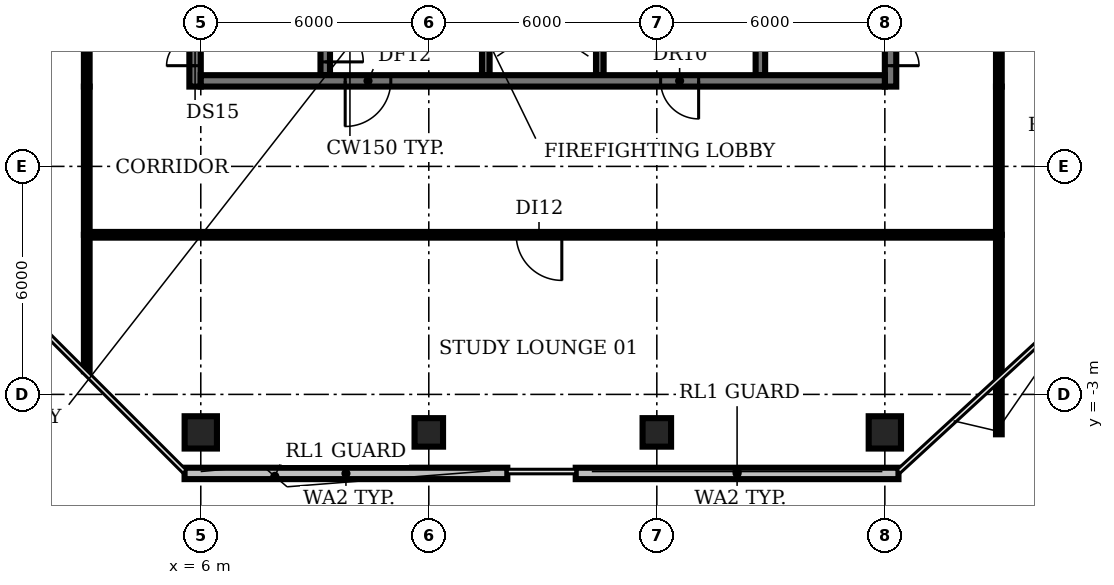
"""IFC4 building model, lengths in metres.
Left out: names, types, materials, properties, quantities, classifications, styles, units other than length and angle.
Written with IfcOpenShell. Run it as: python <this file> out.ifc"""

import sys

from ifc_helpers import new_model, si_unit, direction, frame, frame_2d, origin, origin_2d, place, context, subcontext, project, spatial, rectangle, circle, extrude, element, fill, save


model = new_model("IFC4")
c1 = context("Model", 3, precision=1e-05, world=origin(), true_north=direction((0.0, 1.0)))
c2 = subcontext(c1, "Body", "Model", "MODEL_VIEW")
j1 = project(units=[si_unit("LENGTHUNIT", "METRE"), si_unit("PLANEANGLEUNIT", "RADIAN")], contexts=[c1])
p1 = place(None, origin())
s1 = spatial("IfcSite", under=j1, at=p1, CompositionType="ELEMENT")
p2 = place(p1, origin())
s2 = spatial("IfcBuilding", under=s1, at=p2, CompositionType="ELEMENT")
p3 = place(p2, frame((0.0, 0.0, 306.2)))
s3 = spatial("IfcBuildingStorey", under=s2, at=p3, CompositionType="ELEMENT", Elevation=306.2)
p4 = place(p3, frame((6.0, -4.0, 0.0), z_axis=(0.0, 0.0, 1.0), x_axis=(1.0, 0.0, 0.0)))
e1 = element("IfcColumn", 1, at=p4, inside=s3, PredefinedType="COLUMN", context=c2, shape_type="SweptSolid", body=[
    extrude(circle(Radius=0.425, at=origin_2d()), origin(), (0.0, 0.0, 1.0), 3.85),
])
for number, where, z_axis, x_axis in (
    (2, (12.0, -4.0, 0.0), (0.0, 0.0, 1.0), (1.0, 0.0, 0.0)),
    (3, (18.0, -4.0, 0.0), (0.0, 0.0, 1.0), (1.0, 0.0, 0.0)),
):
    element("IfcColumn", number, at=place(p3, frame(where, z_axis=z_axis, x_axis=x_axis)), inside=s3, PredefinedType="COLUMN", context=c2, shape_type="SweptSolid", body=[
        extrude(rectangle(XDim=0.75, YDim=0.75, at=origin_2d()), origin(), (0.0, 0.0, 1.0), 3.85),
    ])
p5 = place(p3, frame((24.0, -4.0, 0.0), z_axis=(0.0, 0.0, 1.0), x_axis=(1.0, 0.0, 0.0)))
e4 = element("IfcColumn", 4, at=p5, inside=s3, PredefinedType="COLUMN", context=c2, shape_type="SweptSolid", body=[
    extrude(circle(Radius=0.425, at=origin_2d()), origin(), (0.0, 0.0, 1.0), 3.85),
])
p6 = place(p3, frame((5.573, -5.08, 0.0), z_axis=(0.0, 0.0, 1.0), x_axis=(1.0, 0.0, 0.0)))
e5 = element("IfcWall", 5, at=p6, inside=s3, PredefinedType="SOLIDWALL", context=c2, shape_type="SweptSolid", body=[
    extrude(rectangle(XDim=8.492, YDim=0.3, at=frame_2d((4.246, 0.0))), origin(), (0.0, 0.0, 1.0), 3.85),
])
p7 = place(p3, frame((15.866, -5.08, 0.0), z_axis=(0.0, 0.0, 1.0), x_axis=(1.0, 0.0, 0.0)))
e6 = element("IfcWall", 6, at=p7, inside=s3, PredefinedType="SOLIDWALL", context=c2, shape_type="SweptSolid", body=[
    extrude(rectangle(XDim=8.493, YDim=0.3, at=frame_2d((4.246, 0.0))), origin(), (0.0, 0.0, 1.0), 3.85),
])
p8 = place(p3, frame((9.275, 11.825, 0.0), z_axis=(0.0, 0.0, 1.0), x_axis=(0.0, -1.0, 0.0)))
e7 = element("IfcWall", 7, at=p8, inside=s3, PredefinedType="SHEAR", context=c2, shape_type="SweptSolid", body=[
    extrude(rectangle(XDim=6.425, YDim=0.25, at=frame_2d((3.212, 0.0))), origin(), (0.0, 0.0, 1.0), 3.85),
])
p9 = place(p8, frame((5.075, 0.0, 0.0)))
e8 = element("IfcOpeningElement", 8, at=p9, cuts=e7, PredefinedType="OPENING", context=c2, shape_type="SweptSolid", body=[
    extrude(rectangle(XDim=1.0, YDim=2.1, at=frame_2d((0.5, 1.05))), frame((0.0, 0.135, 0.0), z_axis=(0.0, -1.0, 0.0), x_axis=(1.0, 0.0, 0.0)), (0.0, 0.0, 1.0), 0.27),
])
p10 = place(p3, frame((13.5, 5.4, 0.0), z_axis=(0.0, 0.0, 1.0), x_axis=(0.0, 1.0, 0.0)))
e9 = element("IfcWall", 9, at=p10, inside=s3, PredefinedType="SHEAR", context=c2, shape_type="SweptSolid", body=[
    extrude(rectangle(XDim=8.2, YDim=0.2, at=frame_2d((4.1, 0.0))), origin(), (0.0, 0.0, 1.0), 3.85),
])
p11 = place(p10, frame((0.75, 0.0, 0.0)))
e10 = element("IfcOpeningElement", 10, at=p11, cuts=e9, PredefinedType="OPENING", context=c2, shape_type="SweptSolid", body=[
    extrude(rectangle(XDim=1.1, YDim=2.1, at=frame_2d((0.55, 1.05))), frame((0.0, 0.11, 0.0), z_axis=(0.0, -1.0, 0.0), x_axis=(1.0, 0.0, 0.0)), (0.0, 0.0, 1.0), 0.22),
])
p12 = place(p10, frame((3.55, 0.0, 0.0)))
e11 = element("IfcOpeningElement", 11, at=p12, cuts=e9, PredefinedType="OPENING", context=c2, shape_type="SweptSolid", body=[
    extrude(rectangle(XDim=1.1, YDim=2.1, at=frame_2d((0.55, 1.05))), frame((0.0, 0.11, 0.0), z_axis=(0.0, -1.0, 0.0), x_axis=(1.0, 0.0, 0.0)), (0.0, 0.0, 1.0), 0.22),
])
p13 = place(p10, frame((6.35, 0.0, 0.0)))
e12 = element("IfcOpeningElement", 12, at=p13, cuts=e9, PredefinedType="OPENING", context=c2, shape_type="SweptSolid", body=[
    extrude(rectangle(XDim=1.1, YDim=2.1, at=frame_2d((0.55, 1.05))), frame((0.0, 0.11, 0.0), z_axis=(0.0, -1.0, 0.0), x_axis=(1.0, 0.0, 0.0)), (0.0, 0.0, 1.0), 0.22),
])
p14 = place(p3, frame((16.5, 5.4, 0.0), z_axis=(0.0, 0.0, 1.0), x_axis=(0.0, 1.0, 0.0)))
e13 = element("IfcWall", 13, at=p14, inside=s3, PredefinedType="SHEAR", context=c2, shape_type="SweptSolid", body=[
    extrude(rectangle(XDim=8.2, YDim=0.2, at=frame_2d((4.1, 0.0))), origin(), (0.0, 0.0, 1.0), 3.85),
])
p15 = place(p3, frame((20.725, 5.4, 0.0), z_axis=(0.0, 0.0, 1.0), x_axis=(0.0, 1.0, 0.0)))
e14 = element("IfcWall", 14, at=p15, inside=s3, PredefinedType="SHEAR", context=c2, shape_type="SweptSolid", body=[
    extrude(rectangle(XDim=6.3, YDim=0.25, at=frame_2d((3.15, 0.0))), origin(), (0.0, 0.0, 1.0), 3.85),
])
p16 = place(p3, frame((5.85, 5.1, 0.0), z_axis=(0.0, 0.0, 1.0), x_axis=(0.0, 1.0, 0.0)))
e15 = element("IfcWall", 15, at=p16, inside=s3, PredefinedType="SHEAR", context=c2, shape_type="SweptSolid", body=[
    extrude(rectangle(XDim=20.0, YDim=0.3, at=frame_2d((10.0, 0.0))), origin(), (0.0, 0.0, 1.0), 3.85),
])
p17 = place(p16, frame((0.55, 0.0, 0.0)))
e16 = element("IfcOpeningElement", 16, at=p17, cuts=e15, PredefinedType="OPENING", context=c2, shape_type="SweptSolid", body=[
    extrude(rectangle(XDim=1.5, YDim=2.1, at=frame_2d((0.75, 1.05))), frame((0.0, 0.16, 0.0), z_axis=(0.0, -1.0, 0.0), x_axis=(1.0, 0.0, 0.0)), (0.0, 0.0, 1.0), 0.32),
])
p18 = place(p16, frame((7.0, 0.0, 0.0)))
e17 = element("IfcOpeningElement", 17, at=p18, cuts=e15, PredefinedType="OPENING", context=c2, shape_type="SweptSolid", body=[
    extrude(rectangle(XDim=1.2, YDim=2.1, at=frame_2d((0.6, 1.05))), frame((0.0, 0.16, 0.0), z_axis=(0.0, -1.0, 0.0), x_axis=(1.0, 0.0, 0.0)), (0.0, 0.0, 1.0), 0.32),
])
p19 = place(p16, frame((13.55, 0.0, 0.0)))
e18 = element("IfcOpeningElement", 18, at=p19, cuts=e15, PredefinedType="OPENING", context=c2, shape_type="SweptSolid", body=[
    extrude(rectangle(XDim=1.2, YDim=2.1, at=frame_2d((0.6, 1.05))), frame((0.0, 0.16, 0.0), z_axis=(0.0, -1.0, 0.0), x_axis=(1.0, 0.0, 0.0)), (0.0, 0.0, 1.0), 0.32),
])
p20 = place(p3, frame((24.15, 25.655, 0.0), z_axis=(0.0, 0.0, 1.0), x_axis=(0.0, -1.0, 0.0)))
e19 = element("IfcWall", 19, at=p20, inside=s3, PredefinedType="SHEAR", context=c2, shape_type="SweptSolid", body=[
    extrude(rectangle(XDim=20.555, YDim=0.3, at=frame_2d((10.277, 0.0))), origin(), (0.0, 0.0, 1.0), 3.85),
])
p21 = place(p20, frame((18.505, 0.0, 0.0)))
e20 = element("IfcOpeningElement", 20, at=p21, cuts=e19, PredefinedType="OPENING", context=c2, shape_type="SweptSolid", body=[
    extrude(rectangle(XDim=1.5, YDim=2.1, at=frame_2d((0.75, 1.05))), frame((0.0, 0.16, 0.0), z_axis=(0.0, -1.0, 0.0), x_axis=(1.0, 0.0, 0.0)), (0.0, 0.0, 1.0), 0.32),
])
p22 = place(p20, frame((12.405, 0.0, 0.0)))
e21 = element("IfcOpeningElement", 21, at=p22, cuts=e19, PredefinedType="OPENING", context=c2, shape_type="SweptSolid", body=[
    extrude(rectangle(XDim=0.9, YDim=2.1, at=frame_2d((0.45, 1.05))), frame((0.0, 0.16, 0.0), z_axis=(0.0, -1.0, 0.0), x_axis=(1.0, 0.0, 0.0)), (0.0, 0.0, 1.0), 0.32),
])
p23 = place(p20, frame((6.405, 0.0, 0.0)))
e22 = element("IfcOpeningElement", 22, at=p23, cuts=e19, PredefinedType="OPENING", context=c2, shape_type="SweptSolid", body=[
    extrude(rectangle(XDim=2.0, YDim=2.1, at=frame_2d((1.0, 1.05))), frame((0.0, 0.16, 0.0), z_axis=(0.0, -1.0, 0.0), x_axis=(1.0, 0.0, 0.0)), (0.0, 0.0, 1.0), 0.32),
])
p24 = place(p3, frame((24.0, 5.25, 0.0), z_axis=(0.0, 0.0, 1.0), x_axis=(-1.0, 0.0, 0.0)))
e23 = element("IfcWall", 23, at=p24, inside=s3, PredefinedType="SHEAR", context=c2, shape_type="SweptSolid", body=[
    extrude(rectangle(XDim=18.0, YDim=0.3, at=frame_2d((9.0, 0.0))), origin(), (0.0, 0.0, 1.0), 3.85),
])
p25 = place(p24, frame((13.0, 0.0, 0.0)))
e24 = element("IfcOpeningElement", 24, at=p25, cuts=e23, PredefinedType="OPENING", context=c2, shape_type="SweptSolid", body=[
    extrude(rectangle(XDim=1.2, YDim=2.1, at=frame_2d((0.6, 1.05))), frame((0.0, 0.16, 0.0), z_axis=(0.0, -1.0, 0.0), x_axis=(1.0, 0.0, 0.0)), (0.0, 0.0, 1.0), 0.32),
])
p26 = place(p24, frame((4.9, 0.0, 0.0)))
e25 = element("IfcOpeningElement", 25, at=p26, cuts=e23, PredefinedType="OPENING", context=c2, shape_type="SweptSolid", body=[
    extrude(rectangle(XDim=1.0, YDim=2.1, at=frame_2d((0.5, 1.05))), frame((0.0, 0.16, 0.0), z_axis=(0.0, -1.0, 0.0), x_axis=(1.0, 0.0, 0.0)), (0.0, 0.0, 1.0), 0.32),
])
p27 = place(p3, frame((3.0, -2.39, 0.0), z_axis=(0.0, 0.0, 1.0), x_axis=(0.0, 1.0, 0.0)))
e26 = element("IfcWall", 26, at=p27, inside=s3, PredefinedType="PARTITIONING", context=c2, shape_type="SweptSolid", body=[
    extrude(rectangle(XDim=3.59, YDim=0.15, at=frame_2d((1.795, 0.0))), origin(), (0.0, 0.0, 1.0), 2.9),
])
p28 = place(p3, frame((3.0, 1.2, 0.0), z_axis=(0.0, 0.0, 1.0), x_axis=(0.0, 1.0, 0.0)))
e27 = element("IfcWall", 27, at=p28, inside=s3, PredefinedType="PARTITIONING", context=c2, shape_type="SweptSolid", body=[
    extrude(rectangle(XDim=3.9, YDim=0.15, at=frame_2d((1.95, 0.0))), origin(), (0.0, 0.0, 1.0), 2.9),
])
p29 = place(p3, frame((3.0, 5.1, 0.0), z_axis=(0.0, 0.0, 1.0), x_axis=(0.0, 1.0, 0.0)))
e28 = element("IfcWall", 28, at=p29, inside=s3, PredefinedType="PARTITIONING", context=c2, shape_type="SweptSolid", body=[
    extrude(rectangle(XDim=20.0, YDim=0.15, at=frame_2d((10.0, 0.0))), origin(), (0.0, 0.0, 1.0), 2.9),
])
p30 = place(p29, frame((9.3, 0.0, 0.0)))
e29 = element("IfcOpeningElement", 29, at=p30, cuts=e28, PredefinedType="OPENING", context=c2, shape_type="SweptSolid", body=[
    extrude(rectangle(XDim=1.2, YDim=2.1, at=frame_2d((0.6, 1.05))), frame((0.0, 0.085, 0.0), z_axis=(0.0, -1.0, 0.0), x_axis=(1.0, 0.0, 0.0)), (0.0, 0.0, 1.0), 0.17),
])
p31 = place(p3, frame((27.0, -4.05, 0.0), z_axis=(0.0, 0.0, 1.0), x_axis=(0.0, 1.0, 0.0)))
e30 = element("IfcWall", 30, at=p31, inside=s3, PredefinedType="PARTITIONING", context=c2, shape_type="SweptSolid", body=[
    extrude(rectangle(XDim=5.25, YDim=0.15, at=frame_2d((2.625, 0.0))), origin(), (0.0, 0.0, 1.0), 2.9),
])
p32 = place(p3, frame((27.0, 1.2, 0.0), z_axis=(0.0, 0.0, 1.0), x_axis=(-1.0, 0.0, 0.0)))
e31 = element("IfcWall", 31, at=p32, inside=s3, PredefinedType="PARTITIONING", context=c2, shape_type="SweptSolid", body=[
    extrude(rectangle(XDim=24.0, YDim=0.15, at=frame_2d((12.0, 0.0))), origin(), (0.0, 0.0, 1.0), 2.9),
])
p33 = place(p32, frame((11.5, 0.0, 0.0)))
e32 = element("IfcOpeningElement", 32, at=p33, cuts=e31, PredefinedType="OPENING", context=c2, shape_type="SweptSolid", body=[
    extrude(rectangle(XDim=1.2, YDim=2.1, at=frame_2d((0.6, 1.05))), frame((0.0, 0.085, 0.0), z_axis=(0.0, -1.0, 0.0), x_axis=(1.0, 0.0, 0.0)), (0.0, 0.0, 1.0), 0.17),
])
p34 = place(p3, frame((27.0, 1.2, 0.0), z_axis=(0.0, 0.0, 1.0), x_axis=(0.0, 1.0, 0.0)))
e33 = element("IfcWall", 33, at=p34, inside=s3, PredefinedType="PARTITIONING", context=c2, shape_type="SweptSolid", body=[
    extrude(rectangle(XDim=3.9, YDim=0.15, at=frame_2d((1.95, 0.0))), origin(), (0.0, 0.0, 1.0), 2.9),
])
p35 = place(p3, frame((27.0, 14.85, 0.0), z_axis=(0.0, 0.0, 1.0), x_axis=(0.0, -1.0, 0.0)))
e34 = element("IfcWall", 34, at=p35, inside=s3, PredefinedType="PARTITIONING", context=c2, shape_type="SweptSolid", body=[
    extrude(rectangle(XDim=9.75, YDim=0.15, at=frame_2d((4.875, 0.0))), origin(), (0.0, 0.0, 1.0), 2.9),
])
p36 = place(p35, frame((4.15, 0.0, 0.0)))
e35 = element("IfcOpeningElement", 35, at=p36, cuts=e34, PredefinedType="OPENING", context=c2, shape_type="SweptSolid", body=[
    extrude(rectangle(XDim=1.2, YDim=2.1, at=frame_2d((0.6, 1.05))), frame((0.0, 0.085, 0.0), z_axis=(0.0, -1.0, 0.0), x_axis=(1.0, 0.0, 0.0)), (0.0, 0.0, 1.0), 0.17),
])
p37 = place(p9, origin())
e36 = element("IfcDoor", 36, at=p37, inside=s3, OperationType="SINGLE_SWING_RIGHT", PredefinedType="DOOR", context=c2, shape_type="SweptSolid", body=[
    extrude(rectangle(XDim=1.0, YDim=2.1, at=frame_2d((0.5, 1.05))), frame((0.0, 0.025, 0.0), z_axis=(0.0, -1.0, 0.0), x_axis=(1.0, 0.0, 0.0)), (0.0, 0.0, 1.0), 0.05),
])
fill(e8, e36)
p38 = place(p17, origin())
e37 = element("IfcDoor", 37, at=p38, inside=s3, OperationType="DOUBLE_DOOR_SINGLE_SWING", PredefinedType="DOOR", context=c2, shape_type="SweptSolid", body=[
    extrude(rectangle(XDim=1.5, YDim=2.1, at=frame_2d((0.75, 1.05))), frame((0.0, 0.025, 0.0), z_axis=(0.0, -1.0, 0.0), x_axis=(1.0, 0.0, 0.0)), (0.0, 0.0, 1.0), 0.05),
])
fill(e16, e37)
p39 = place(p21, origin())
e38 = element("IfcDoor", 38, at=p39, inside=s3, OperationType="DOUBLE_DOOR_SINGLE_SWING", PredefinedType="DOOR", context=c2, shape_type="SweptSolid", body=[
    extrude(rectangle(XDim=1.5, YDim=2.1, at=frame_2d((0.75, 1.05))), frame((0.0, 0.025, 0.0), z_axis=(0.0, -1.0, 0.0), x_axis=(1.0, 0.0, 0.0)), (0.0, 0.0, 1.0), 0.05),
])
fill(e20, e38)
p40 = place(p25, origin())
e39 = element("IfcDoor", 39, at=p40, inside=s3, OperationType="SINGLE_SWING_RIGHT", PredefinedType="DOOR", context=c2, shape_type="SweptSolid", body=[
    extrude(rectangle(XDim=1.2, YDim=2.1, at=frame_2d((0.6, 1.05))), frame((0.0, 0.025, 0.0), z_axis=(0.0, -1.0, 0.0), x_axis=(1.0, 0.0, 0.0)), (0.0, 0.0, 1.0), 0.05),
])
fill(e24, e39)
p41 = place(p26, origin())
e40 = element("IfcDoor", 40, at=p41, inside=s3, OperationType="SINGLE_SWING_LEFT", PredefinedType="DOOR", context=c2, shape_type="SweptSolid", body=[
    extrude(rectangle(XDim=1.0, YDim=2.1, at=frame_2d((0.5, 1.05))), frame((0.0, 0.025, 0.0), z_axis=(0.0, -1.0, 0.0), x_axis=(1.0, 0.0, 0.0)), (0.0, 0.0, 1.0), 0.05),
])
fill(e25, e40)
p42 = place(p33, origin())
e41 = element("IfcDoor", 41, at=p42, inside=s3, OperationType="SINGLE_SWING_LEFT", PredefinedType="DOOR", context=c2, shape_type="SweptSolid", body=[
    extrude(rectangle(XDim=1.2, YDim=2.1, at=frame_2d((0.6, 1.05))), frame((0.0, 0.025, 0.0), z_axis=(0.0, -1.0, 0.0), x_axis=(1.0, 0.0, 0.0)), (0.0, 0.0, 1.0), 0.05),
])
fill(e32, e41)
save(model, sys.argv[1])
